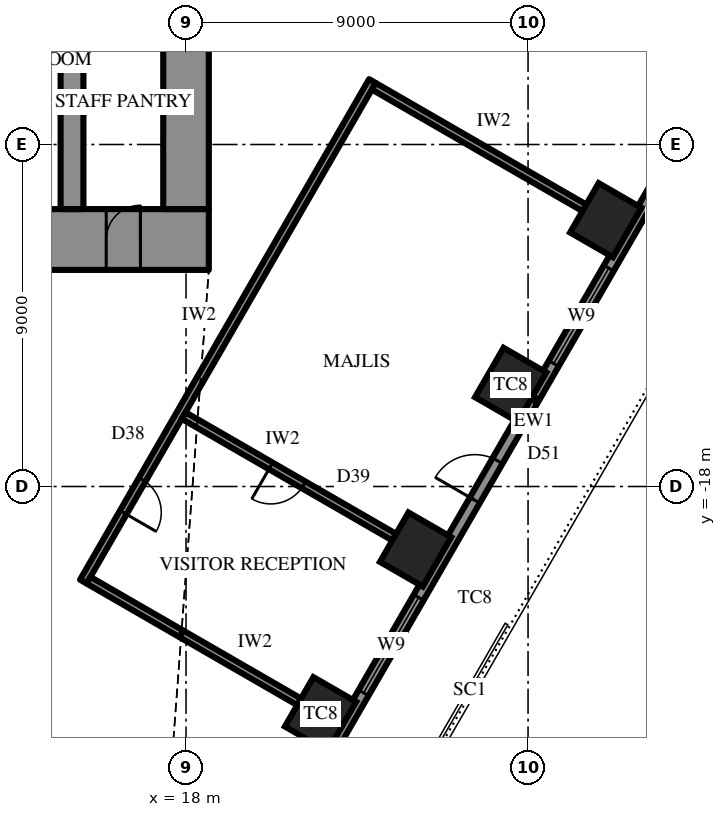
"""IFC4 building model, lengths in metres.
Left out: names, types, materials, properties, quantities, classifications, styles, units other than length and angle.
Written with IfcOpenShell. Run it as: python <this file> out.ifc"""

import sys

from ifc_helpers import new_model, si_unit, direction, frame, frame_2d, origin, origin_2d, place, context, subcontext, project, spatial, rectangle, extrude, element, fill, save


model = new_model("IFC4")
c1 = context("Model", 3, precision=1e-05, world=origin(), true_north=direction((0.0, 1.0)))
c2 = subcontext(c1, "Body", "Model", "MODEL_VIEW")
j1 = project(units=[si_unit("LENGTHUNIT", "METRE"), si_unit("PLANEANGLEUNIT", "RADIAN")], contexts=[c1])
p1 = place(None, origin())
s1 = spatial("IfcSite", under=j1, at=p1, CompositionType="ELEMENT")
p2 = place(p1, origin())
s2 = spatial("IfcBuilding", under=s1, at=p2, CompositionType="ELEMENT")
p3 = place(p2, frame((0.0, 0.0, 190.9)))
s3 = spatial("IfcBuildingStorey", under=s2, at=p3, CompositionType="ELEMENT", Elevation=190.9)
for number, where, z_axis, x_axis in (
    (1, (21.54, -23.992, 0.0), (0.0, 0.0, 1.0), (0.5, 0.866, 0.0)),
    (2, (24.042, -19.658, 0.0), (0.0, 0.0, 1.0), (0.5, 0.866, 0.0)),
    (3, (26.544, -15.325, 0.0), (0.0, 0.0, 1.0), (0.5, 0.866, 0.0)),
    (4, (29.045, -10.992, 0.0), (0.0, 0.0, 1.0), (0.5, 0.866, 0.0)),
):
    element("IfcColumn", number, at=place(p3, frame(where, z_axis=z_axis, x_axis=x_axis)), inside=s3, PredefinedType="COLUMN", context=c2, shape_type="SweptSolid", body=[
        extrude(rectangle(XDim=1.5, YDim=1.3, at=origin_2d()), origin(), (0.0, 0.0, 1.0), 4.2),
    ])
p4 = place(p3, frame((18.6, -11.5, 0.0), z_axis=(0.0, 0.0, 1.0), x_axis=(-1.0, 0.0, 0.0)))
e5 = element("IfcWall", 5, at=p4, inside=s3, PredefinedType="SHEAR", context=c2, shape_type="SweptSolid", body=[
    extrude(rectangle(XDim=37.2, YDim=1.6, at=frame_2d((18.6, 0.0))), origin(), (0.0, 0.0, 1.0), 4.2),
])
p5 = place(p4, frame((19.45, 0.0, 0.0)))
e6 = element("IfcOpeningElement", 6, at=p5, cuts=e5, PredefinedType="OPENING", context=c2, shape_type="SweptSolid", body=[
    extrude(rectangle(XDim=0.9, YDim=2.2, at=frame_2d((0.45, 1.1))), frame((0.0, 0.81, 0.0), z_axis=(0.0, -1.0, 0.0), x_axis=(1.0, 0.0, 0.0)), (0.0, 0.0, 1.0), 1.62),
])
p6 = place(p4, frame((22.45, 0.0, 0.0)))
e7 = element("IfcOpeningElement", 7, at=p6, cuts=e5, PredefinedType="OPENING", context=c2, shape_type="SweptSolid", body=[
    extrude(rectangle(XDim=0.9, YDim=2.2, at=frame_2d((0.45, 1.1))), frame((0.0, 0.81, 0.0), z_axis=(0.0, -1.0, 0.0), x_axis=(1.0, 0.0, 0.0)), (0.0, 0.0, 1.0), 1.62),
])
p7 = place(p4, frame((25.5, 0.0, 0.0)))
e8 = element("IfcOpeningElement", 8, at=p7, cuts=e5, PredefinedType="OPENING", context=c2, shape_type="SweptSolid", body=[
    extrude(rectangle(XDim=1.0, YDim=2.2, at=frame_2d((0.5, 1.1))), frame((0.0, 0.81, 0.0), z_axis=(0.0, -1.0, 0.0), x_axis=(1.0, 0.0, 0.0)), (0.0, 0.0, 1.0), 1.62),
])
p8 = place(p4, frame((1.8, 0.0, 0.0)))
e9 = element("IfcOpeningElement", 9, at=p8, cuts=e5, PredefinedType="OPENING", context=c2, shape_type="SweptSolid", body=[
    extrude(rectangle(XDim=0.9, YDim=2.2, at=frame_2d((0.45, 1.1))), frame((0.0, 0.81, 0.0), z_axis=(0.0, -1.0, 0.0), x_axis=(1.0, 0.0, 0.0)), (0.0, 0.0, 1.0), 1.62),
])
p9 = place(p4, frame((4.65, 0.0, 0.0)))
e10 = element("IfcOpeningElement", 10, at=p9, cuts=e5, PredefinedType="OPENING", context=c2, shape_type="SweptSolid", body=[
    extrude(rectangle(XDim=0.9, YDim=2.2, at=frame_2d((0.45, 1.1))), frame((0.0, 0.81, 0.0), z_axis=(0.0, -1.0, 0.0), x_axis=(1.0, 0.0, 0.0)), (0.0, 0.0, 1.0), 1.62),
])
p10 = place(p4, frame((7.75, 0.0, 0.0)))
e11 = element("IfcOpeningElement", 11, at=p10, cuts=e5, PredefinedType="OPENING", context=c2, shape_type="SweptSolid", body=[
    extrude(rectangle(XDim=0.9, YDim=2.2, at=frame_2d((0.45, 1.1))), frame((0.0, 0.81, 0.0), z_axis=(0.0, -1.0, 0.0), x_axis=(1.0, 0.0, 0.0)), (0.0, 0.0, 1.0), 1.62),
])
p11 = place(p4, frame((28.55, 0.0, 0.0)))
e12 = element("IfcOpeningElement", 12, at=p11, cuts=e5, PredefinedType="OPENING", context=c2, shape_type="SweptSolid", body=[
    extrude(rectangle(XDim=0.9, YDim=2.2, at=frame_2d((0.45, 1.1))), frame((0.0, 0.81, 0.0), z_axis=(0.0, -1.0, 0.0), x_axis=(1.0, 0.0, 0.0)), (0.0, 0.0, 1.0), 1.62),
])
p12 = place(p4, frame((31.65, 0.0, 0.0)))
e13 = element("IfcOpeningElement", 13, at=p12, cuts=e5, PredefinedType="OPENING", context=c2, shape_type="SweptSolid", body=[
    extrude(rectangle(XDim=0.9, YDim=2.2, at=frame_2d((0.45, 1.1))), frame((0.0, 0.81, 0.0), z_axis=(0.0, -1.0, 0.0), x_axis=(1.0, 0.0, 0.0)), (0.0, 0.0, 1.0), 1.62),
])
p13 = place(p4, frame((34.5, 0.0, 0.0)))
e14 = element("IfcOpeningElement", 14, at=p13, cuts=e5, PredefinedType="OPENING", context=c2, shape_type="SweptSolid", body=[
    extrude(rectangle(XDim=0.9, YDim=2.2, at=frame_2d((0.45, 1.1))), frame((0.0, 0.81, 0.0), z_axis=(0.0, -1.0, 0.0), x_axis=(1.0, 0.0, 0.0)), (0.0, 0.0, 1.0), 1.62),
])
p14 = place(p3, frame((18.0, -10.7, 0.0), z_axis=(0.0, 0.0, 1.0), x_axis=(0.0, 1.0, 0.0)))
e15 = element("IfcWall", 15, at=p14, inside=s3, PredefinedType="SHEAR", context=c2, shape_type="SweptSolid", body=[
    extrude(rectangle(XDim=21.4, YDim=1.2, at=frame_2d((10.7, 0.0))), origin(), (0.0, 0.0, 1.0), 4.2),
])
p15 = place(p14, frame((9.8, 0.0, 0.0)))
e16 = element("IfcOpeningElement", 16, at=p15, cuts=e15, PredefinedType="OPENING", context=c2, shape_type="SweptSolid", body=[
    extrude(rectangle(XDim=1.8, YDim=2.4, at=frame_2d((0.9, 1.2))), frame((0.0, 0.61, 0.0), z_axis=(0.0, -1.0, 0.0), x_axis=(1.0, 0.0, 0.0)), (0.0, 0.0, 1.0), 1.22),
])
p16 = place(p3, frame((15.0, -10.7, 0.0), z_axis=(0.0, 0.0, 1.0), x_axis=(0.0, 1.0, 0.0)))
e17 = element("IfcWall", 17, at=p16, inside=s3, PredefinedType="SHEAR", context=c2, shape_type="SweptSolid", body=[
    extrude(rectangle(XDim=21.4, YDim=0.6, at=frame_2d((10.7, 0.0))), origin(), (0.0, 0.0, 1.0), 4.2),
])
p17 = place(p16, frame((9.8, 0.0, 0.0)))
e18 = element("IfcOpeningElement", 18, at=p17, cuts=e17, PredefinedType="OPENING", context=c2, shape_type="SweptSolid", body=[
    extrude(rectangle(XDim=1.8, YDim=2.4, at=frame_2d((0.9, 1.2))), frame((0.0, 0.31, 0.0), z_axis=(0.0, -1.0, 0.0), x_axis=(1.0, 0.0, 0.0)), (0.0, 0.0, 1.0), 0.62),
])
p18 = place(p3, frame((19.644, -28.675, 0.0), z_axis=(0.0, 0.0, 1.0), x_axis=(0.500003084452, 0.866023622968, 0.0)))
e19 = element("IfcWall", 19, at=p18, inside=s3, PredefinedType="SOLIDWALL", context=c2, shape_type="SweptSolid", body=[
    extrude(rectangle(XDim=30.022, YDim=0.3, at=frame_2d((15.011, 0.0))), origin(), (0.0, 0.0, 1.0), 2.75),
])
p19 = place(p18, frame((1.052, 0.0, 0.6)))
e20 = element("IfcOpeningElement", 20, at=p19, cuts=e19, PredefinedType="OPENING", context=c2, shape_type="SweptSolid", body=[
    extrude(rectangle(XDim=2.9, YDim=1.9, at=frame_2d((1.45, 0.95))), frame((0.0, 0.16, 0.0), z_axis=(0.0, -1.0, 0.0), x_axis=(1.0, 0.0, 0.0)), (0.0, 0.0, 1.0), 0.32),
])
p20 = place(p18, frame((6.056, 0.0, 0.6)))
e21 = element("IfcOpeningElement", 21, at=p20, cuts=e19, PredefinedType="OPENING", context=c2, shape_type="SweptSolid", body=[
    extrude(rectangle(XDim=2.9, YDim=1.9, at=frame_2d((1.45, 0.95))), frame((0.0, 0.16, 0.0), z_axis=(0.0, -1.0, 0.0), x_axis=(1.0, 0.0, 0.0)), (0.0, 0.0, 1.0), 0.32),
])
p21 = place(p18, frame((11.909, 0.0, 0.0)))
e22 = element("IfcOpeningElement", 22, at=p21, cuts=e19, PredefinedType="OPENING", context=c2, shape_type="SweptSolid", body=[
    extrude(rectangle(XDim=1.2, YDim=2.4, at=frame_2d((0.6, 1.2))), frame((0.0, 0.16, 0.0), z_axis=(0.0, -1.0, 0.0), x_axis=(1.0, 0.0, 0.0)), (0.0, 0.0, 1.0), 0.32),
])
p22 = place(p18, frame((16.063, 0.0, 0.6)))
e23 = element("IfcOpeningElement", 23, at=p22, cuts=e19, PredefinedType="OPENING", context=c2, shape_type="SweptSolid", body=[
    extrude(rectangle(XDim=2.9, YDim=1.9, at=frame_2d((1.45, 0.95))), frame((0.0, 0.16, 0.0), z_axis=(0.0, -1.0, 0.0), x_axis=(1.0, 0.0, 0.0)), (0.0, 0.0, 1.0), 0.32),
])
p23 = place(p18, frame((21.067, 0.0, 0.6)))
e24 = element("IfcOpeningElement", 24, at=p23, cuts=e19, PredefinedType="OPENING", context=c2, shape_type="SweptSolid", body=[
    extrude(rectangle(XDim=2.9, YDim=1.9, at=frame_2d((1.45, 0.95))), frame((0.0, 0.16, 0.0), z_axis=(0.0, -1.0, 0.0), x_axis=(1.0, 0.0, 0.0)), (0.0, 0.0, 1.0), 0.32),
])
p24 = place(p18, frame((26.07, 0.0, 0.6)))
e25 = element("IfcOpeningElement", 25, at=p24, cuts=e19, PredefinedType="OPENING", context=c2, shape_type="SweptSolid", body=[
    extrude(rectangle(XDim=2.9, YDim=1.9, at=frame_2d((1.45, 0.95))), frame((0.0, 0.16, 0.0), z_axis=(0.0, -1.0, 0.0), x_axis=(1.0, 0.0, 0.0)), (0.0, 0.0, 1.0), 0.32),
])
p25 = place(p3, frame((15.298, -20.503, 0.0), z_axis=(0.0, 0.0, 1.0), x_axis=(0.500010972563, 0.86601906868, 0.0)))
e26 = element("IfcWall", 26, at=p25, inside=s3, PredefinedType="PARTITIONING", context=c2, shape_type="SweptSolid", body=[
    extrude(rectangle(XDim=15.211, YDim=0.2, at=frame_2d((7.605, 0.0))), origin(), (0.0, 0.0, 1.0), 4.0),
])
p26 = place(p25, frame((2.102, 0.0, 0.0)))
e27 = element("IfcOpeningElement", 27, at=p26, cuts=e26, PredefinedType="OPENING", context=c2, shape_type="SweptSolid", body=[
    extrude(rectangle(XDim=1.0, YDim=2.2, at=frame_2d((0.5, 1.1))), frame((0.0, 0.11, 0.0), z_axis=(0.0, -1.0, 0.0), x_axis=(1.0, 0.0, 0.0)), (0.0, 0.0, 1.0), 0.22),
])
p27 = place(p3, frame((15.435, -20.467, 0.0), z_axis=(0.0, 0.0, 1.0), x_axis=(0.866008320966, -0.500029587143, 0.0)))
e28 = element("IfcWall", 28, at=p27, inside=s3, PredefinedType="PARTITIONING", context=c2, shape_type="SweptSolid", body=[
    extrude(rectangle(XDim=2.821, YDim=0.2, at=frame_2d((1.411, 0.0))), origin(), (0.0, 0.0, 1.0), 4.0),
])
p28 = place(p3, frame((17.878, -21.877, 0.0), z_axis=(0.0, 0.0, 1.0), x_axis=(0.866009501729, -0.500027542156, 0.0)))
e29 = element("IfcWall", 29, at=p28, inside=s3, PredefinedType="PARTITIONING", context=c2, shape_type="SweptSolid", body=[
    extrude(rectangle(XDim=3.579, YDim=0.2, at=frame_2d((1.79, 0.0))), origin(), (0.0, 0.0, 1.0), 3.082),
])
p29 = place(p3, frame((17.936, -16.133, 0.0), z_axis=(0.0, 0.0, 1.0), x_axis=(0.866035036182, -0.499983315828, 0.0)))
e30 = element("IfcWall", 30, at=p29, inside=s3, PredefinedType="PARTITIONING", context=c2, shape_type="SweptSolid", body=[
    extrude(rectangle(XDim=6.4, YDim=0.2, at=frame_2d((3.2, 0.0))), origin(), (0.0, 0.0, 1.0), 3.082),
])
p30 = place(p29, frame((2.65, 0.0, 0.0)))
e31 = element("IfcOpeningElement", 31, at=p30, cuts=e30, PredefinedType="OPENING", context=c2, shape_type="SweptSolid", body=[
    extrude(rectangle(XDim=1.0, YDim=2.2, at=frame_2d((0.5, 1.1))), frame((0.0, 0.11, 0.0), z_axis=(0.0, -1.0, 0.0), x_axis=(1.0, 0.0, 0.0)), (0.0, 0.0, 1.0), 0.22),
])
p31 = place(p3, frame((22.94, -7.467, 0.0), z_axis=(0.0, 0.0, 1.0), x_axis=(0.866018518567, -0.500011925357, 0.0)))
e32 = element("IfcWall", 32, at=p31, inside=s3, PredefinedType="PARTITIONING", context=c2, shape_type="SweptSolid", body=[
    extrude(rectangle(XDim=6.4, YDim=0.2, at=frame_2d((3.2, 0.0))), origin(), (0.0, 0.0, 1.0), 3.082),
])
p32 = place(p20, origin())
e33 = element("IfcWindow", 33, at=p32, inside=s3, PartitioningType="SINGLE_PANEL", PredefinedType="WINDOW", context=c2, shape_type="SweptSolid", body=[
    extrude(rectangle(XDim=2.9, YDim=1.9, at=frame_2d((1.45, 0.95))), frame((0.0, 0.03, 0.0), z_axis=(0.0, -1.0, 0.0), x_axis=(1.0, 0.0, 0.0)), (0.0, 0.0, 1.0), 0.06),
])
fill(e21, e33)
p33 = place(p21, origin())
e34 = element("IfcDoor", 34, at=p33, inside=s3, OperationType="SINGLE_SWING_RIGHT", PredefinedType="DOOR", context=c2, shape_type="SweptSolid", body=[
    extrude(rectangle(XDim=1.2, YDim=2.4, at=frame_2d((0.6, 1.2))), frame((0.0, 0.025, 0.0), z_axis=(0.0, -1.0, 0.0), x_axis=(1.0, 0.0, 0.0)), (0.0, 0.0, 1.0), 0.05),
])
fill(e22, e34)
p34 = place(p22, origin())
e35 = element("IfcWindow", 35, at=p34, inside=s3, PartitioningType="SINGLE_PANEL", PredefinedType="WINDOW", context=c2, shape_type="SweptSolid", body=[
    extrude(rectangle(XDim=2.9, YDim=1.9, at=frame_2d((1.45, 0.95))), frame((0.0, 0.03, 0.0), z_axis=(0.0, -1.0, 0.0), x_axis=(1.0, 0.0, 0.0)), (0.0, 0.0, 1.0), 0.06),
])
fill(e23, e35)
p35 = place(p8, frame((0.9, 0.0, 0.0), z_axis=(0.0, 0.0, 1.0), x_axis=(-1.0, 0.0, 0.0)))
e36 = element("IfcDoor", 36, at=p35, inside=s3, OperationType="SINGLE_SWING_LEFT", PredefinedType="DOOR", context=c2, shape_type="SweptSolid", body=[
    extrude(rectangle(XDim=0.9, YDim=2.2, at=frame_2d((0.45, 1.1))), frame((0.0, 0.025, 0.0), z_axis=(0.0, -1.0, 0.0), x_axis=(1.0, 0.0, 0.0)), (0.0, 0.0, 1.0), 0.05),
])
fill(e9, e36)
p36 = place(p26, frame((1.0, 0.0, 0.0), z_axis=(0.0, 0.0, 1.0), x_axis=(-1.0, 0.0, 0.0)))
e37 = element("IfcDoor", 37, at=p36, inside=s3, OperationType="SINGLE_SWING_LEFT", PredefinedType="DOOR", context=c2, shape_type="SweptSolid", body=[
    extrude(rectangle(XDim=1.0, YDim=2.2, at=frame_2d((0.5, 1.1))), frame((0.0, 0.025, 0.0), z_axis=(0.0, -1.0, 0.0), x_axis=(1.0, 0.0, 0.0)), (0.0, 0.0, 1.0), 0.05),
])
fill(e27, e37)
p37 = place(p30, frame((1.0, 0.0, 0.0), z_axis=(0.0, 0.0, 1.0), x_axis=(-1.0, 0.0, 0.0)))
e38 = element("IfcDoor", 38, at=p37, inside=s3, OperationType="SINGLE_SWING_LEFT", PredefinedType="DOOR", context=c2, shape_type="SweptSolid", body=[
    extrude(rectangle(XDim=1.0, YDim=2.2, at=frame_2d((0.5, 1.1))), frame((0.0, 0.025, 0.0), z_axis=(0.0, -1.0, 0.0), x_axis=(1.0, 0.0, 0.0)), (0.0, 0.0, 1.0), 0.05),
])
fill(e31, e38)
save(model, sys.argv[1])
